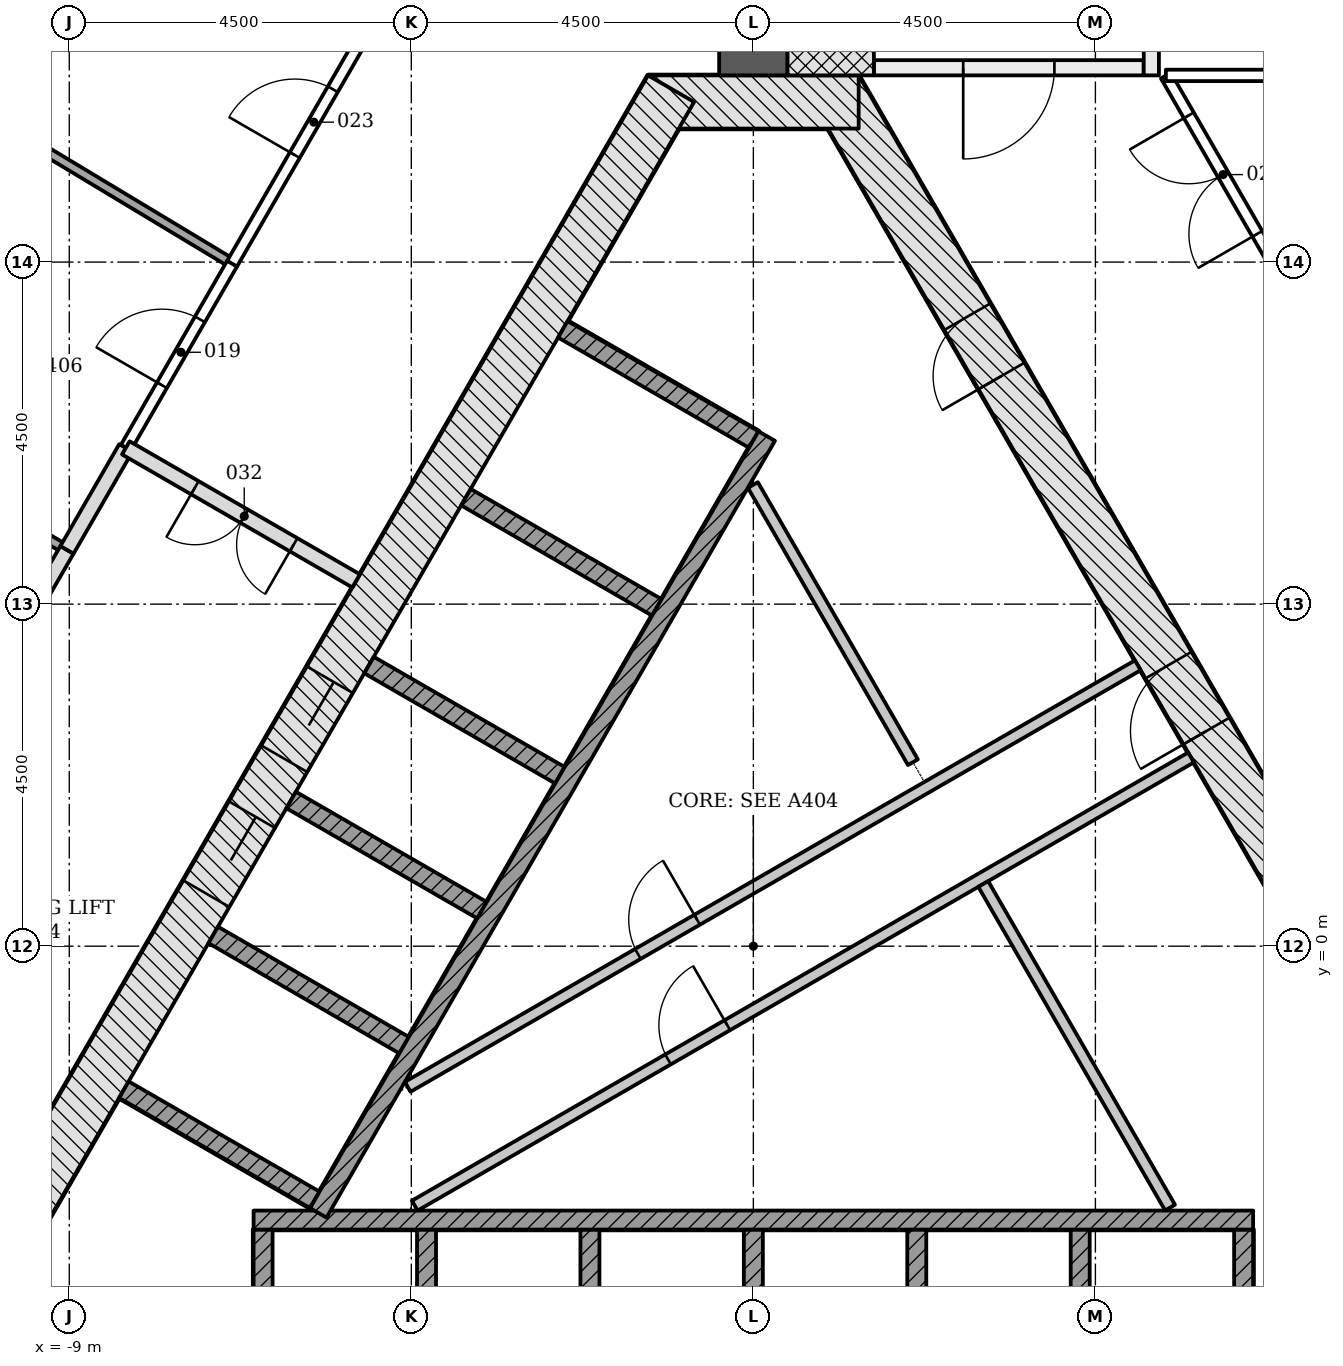
"""IFC4 building model, lengths in metres.
Left out: names, types, materials, properties, quantities, classifications, styles, units other than length and angle.
Written with IfcOpenShell. Run it as: python <this file> out.ifc"""

import sys

from ifc_helpers import new_model, si_unit, direction, frame, frame_2d, origin, place, context, subcontext, project, spatial, rectangle, extrude, element, fill, save


model = new_model("IFC4")
c1 = context("Model", 3, precision=1e-05, world=origin(), true_north=direction((0.0, 1.0)))
c2 = subcontext(c1, "Body", "Model", "MODEL_VIEW")
j1 = project(units=[si_unit("LENGTHUNIT", "METRE"), si_unit("PLANEANGLEUNIT", "RADIAN")], contexts=[c1])
p1 = place(None, origin())
s1 = spatial("IfcSite", under=j1, at=p1, CompositionType="ELEMENT")
p2 = place(p1, origin())
s2 = spatial("IfcBuilding", under=s1, at=p2, CompositionType="ELEMENT")
p3 = place(p2, frame((0.0, 0.0, 19.5)))
s3 = spatial("IfcBuildingStorey", under=s2, at=p3, CompositionType="ELEMENT", Elevation=19.5)
p4 = place(p3, frame((10.311, -4.703, -0.25), z_axis=(0.0, 0.0, 1.0), x_axis=(-0.500001446645, 0.866024568562, 0.0)))
e1 = element("IfcWall", 1, at=p4, inside=s3, PredefinedType="SHEAR", context=c2, shape_type="SweptSolid", body=[
    extrude(rectangle(XDim=18.458, YDim=0.7, at=frame_2d((9.229, 0.0))), origin(), (0.0, 0.0, 1.0), 4.55),
])
p5 = place(p4, frame((8.7, 0.0, 0.25)))
e2 = element("IfcOpeningElement", 2, at=p5, cuts=e1, PredefinedType="OPENING", context=c2, shape_type="SweptSolid", body=[
    extrude(rectangle(XDim=1.0, YDim=2.1, at=frame_2d((0.5, 1.05))), frame((0.0, 0.36, 0.0), z_axis=(0.0, -1.0, 0.0), x_axis=(1.0, 0.0, 0.0)), (0.0, 0.0, 1.0), 0.72),
])
p6 = place(p4, frame((4.002, 0.0, 0.25)))
e3 = element("IfcOpeningElement", 3, at=p6, cuts=e1, PredefinedType="OPENING", context=c2, shape_type="SweptSolid", body=[
    extrude(rectangle(XDim=0.9, YDim=2.1, at=frame_2d((0.45, 1.05))), frame((0.0, 0.36, 0.0), z_axis=(0.0, -1.0, 0.0), x_axis=(1.0, 0.0, 0.0)), (0.0, 0.0, 1.0), 0.72),
])
p7 = place(p4, frame((14.093, 0.0, 0.25)))
e4 = element("IfcOpeningElement", 4, at=p7, cuts=e1, PredefinedType="OPENING", context=c2, shape_type="SweptSolid", body=[
    extrude(rectangle(XDim=0.9, YDim=2.1, at=frame_2d((0.45, 1.05))), frame((0.0, 0.36, 0.0), z_axis=(0.0, -1.0, 0.0), x_axis=(1.0, 0.0, 0.0)), (0.0, 0.0, 1.0), 0.72),
])
p8 = place(p3, frame((1.386, 11.106, -0.25), z_axis=(0.0, 0.0, 1.0), x_axis=(-1.0, 0.0, 0.0)))
e5 = element("IfcWall", 5, at=p8, inside=s3, PredefinedType="SHEAR", context=c2, shape_type="SweptSolid", body=[
    extrude(rectangle(XDim=2.771, YDim=0.7, at=frame_2d((1.386, 0.0))), origin(), (0.0, 0.0, 1.0), 4.55),
])
p9 = place(p3, frame((-1.083, 11.281, -0.25), z_axis=(0.0, 0.0, 1.0), x_axis=(-0.500001446645, -0.866024568562, 0.0)))
e6 = element("IfcWall", 6, at=p9, inside=s3, PredefinedType="SHEAR", context=c2, shape_type="SweptSolid", body=[
    extrude(rectangle(XDim=18.458, YDim=0.7, at=frame_2d((9.229, 0.0))), origin(), (0.0, 0.0, 1.0), 4.55),
])
p10 = place(p9, frame((8.979, 0.0, 0.25)))
e7 = element("IfcOpeningElement", 7, at=p10, cuts=e6, PredefinedType="OPENING", context=c2, shape_type="SweptSolid", body=[
    extrude(rectangle(XDim=1.2, YDim=2.1, at=frame_2d((0.6, 1.05))), frame((0.0, 0.36, 0.0), z_axis=(0.0, -1.0, 0.0), x_axis=(1.0, 0.0, 0.0)), (0.0, 0.0, 1.0), 0.72),
])
p11 = place(p9, frame((11.029, 0.0, 0.25)))
e8 = element("IfcOpeningElement", 8, at=p11, cuts=e6, PredefinedType="OPENING", context=c2, shape_type="SweptSolid", body=[
    extrude(rectangle(XDim=1.2, YDim=2.1, at=frame_2d((0.6, 1.05))), frame((0.0, 0.36, 0.0), z_axis=(0.0, -1.0, 0.0), x_axis=(1.0, 0.0, 0.0)), (0.0, 0.0, 1.0), 0.72),
])
p12 = place(p3, frame((-10.311, -4.353, -0.25), z_axis=(0.0, 0.0, 1.0), x_axis=(0.500042739161, -0.866000726912, 0.0)))
e9 = element("IfcWall", 9, at=p12, inside=s3, PredefinedType="SHEAR", context=c2, shape_type="SweptSolid", body=[
    extrude(rectangle(XDim=2.771, YDim=0.7, at=frame_2d((1.386, 0.0))), origin(), (0.0, 0.0, 1.0), 4.55),
])
p13 = place(p3, frame((0.0, 11.456, -0.25), z_axis=(0.0, 0.0, 1.0), x_axis=(0.0, 1.0, 0.0)))
e10 = element("IfcWall", 10, at=p13, inside=s3, PredefinedType="SHEAR", context=c2, shape_type="SweptSolid", body=[
    extrude(rectangle(XDim=14.633, YDim=0.9, at=frame_2d((7.316, 0.0))), origin(), (0.0, 0.0, 1.0), 4.55),
])
p14 = place(p13, frame((7.35, 0.0, 0.25)))
e11 = element("IfcOpeningElement", 11, at=p14, cuts=e10, PredefinedType="OPENING", context=c2, shape_type="SweptSolid", body=[
    extrude(rectangle(XDim=1.5, YDim=2.1, at=frame_2d((0.75, 1.05))), frame((0.0, 0.46, 0.0), z_axis=(0.0, -1.0, 0.0), x_axis=(1.0, 0.0, 0.0)), (0.0, 0.0, 1.0), 0.92),
])
for number, where, z_axis, x_axis in (
    (12, (-6.45, -6.228, -0.25), (0.0, 0.0, 1.0), (0.0, 1.0, 0.0)),
    (13, (-4.3, -6.228, -0.25), (0.0, 0.0, 1.0), (0.0, 1.0, 0.0)),
    (14, (-2.15, -6.228, -0.25), (0.0, 0.0, 1.0), (0.0, 1.0, 0.0)),
    (15, (0.0, -6.228, -0.25), (0.0, 0.0, 1.0), (0.0, 1.0, 0.0)),
    (16, (2.15, -6.228, -0.25), (0.0, 0.0, 1.0), (0.0, 1.0, 0.0)),
    (17, (4.3, -6.228, -0.25), (0.0, 0.0, 1.0), (0.0, 1.0, 0.0)),
    (18, (6.45, -6.228, -0.25), (0.0, 0.0, 1.0), (0.0, 1.0, 0.0)),
):
    element("IfcWall", number, at=place(p3, frame(where, z_axis=z_axis, x_axis=x_axis)), inside=s3, PredefinedType="PARTITIONING", context=c2, shape_type="SweptSolid", body=[
        extrude(rectangle(XDim=2.5, YDim=0.25, at=frame_2d((1.25, 0.0))), origin(), (0.0, 0.0, 1.0), 4.55),
    ])
p15 = place(p3, frame((-6.575, -3.603, 0.0), z_axis=(0.0, 0.0, 1.0), x_axis=(1.0, 0.0, 0.0)))
e19 = element("IfcWall", 19, at=p15, inside=s3, PredefinedType="PARTITIONING", context=c2, shape_type="SweptSolid", body=[
    extrude(rectangle(XDim=13.15, YDim=0.25, at=frame_2d((6.575, 0.0))), origin(), (0.0, 0.0, 1.0), 4.3),
])
p16 = place(p3, frame((-2.506, 8.115, -0.25), z_axis=(0.0, 0.0, 1.0), x_axis=(0.865996321171, -0.50005036918, 0.0)))
e20 = element("IfcWall", 20, at=p16, inside=s3, PredefinedType="PARTITIONING", context=c2, shape_type="SweptSolid", body=[
    extrude(rectangle(XDim=2.9, YDim=0.25, at=frame_2d((1.45, 0.0))), origin(), (0.0, 0.0, 1.0), 4.55),
])
for number, where, z_axis, x_axis in (
    (21, (-3.781, 5.907, -0.25), (0.0, 0.0, 1.0), (0.866, -0.5, 0.0)),
    (22, (-5.056, 3.699, -0.25), (0.0, 0.0, 1.0), (0.866, -0.5, 0.0)),
    (23, (-6.081, 1.923, -0.25), (0.0, 0.0, 1.0), (0.866, -0.5, 0.0)),
    (24, (-7.106, 0.148, -0.25), (0.0, 0.0, 1.0), (0.866, -0.5, 0.0)),
    (25, (-8.281, -1.887, -0.25), (0.0, 0.0, 1.0), (0.866, -0.5, 0.0)),
):
    element("IfcWall", number, at=place(p3, frame(where, z_axis=z_axis, x_axis=x_axis)), inside=s3, PredefinedType="PARTITIONING", context=c2, shape_type="SweptSolid", body=[
        extrude(rectangle(XDim=2.9, YDim=0.25, at=frame_2d((1.45, 0.0))), origin(), (0.0, 0.0, 1.0), 4.55),
    ])
p17 = place(p3, frame((0.176, 6.711, 0.0), z_axis=(0.0, 0.0, 1.0), x_axis=(-0.500004227369, -0.866022963098, 0.0)))
e26 = element("IfcWall", 26, at=p17, inside=s3, PredefinedType="PARTITIONING", context=c2, shape_type="SweptSolid", body=[
    extrude(rectangle(XDim=11.8, YDim=0.25, at=frame_2d((5.9, 0.0))), origin(), (0.0, 0.0, 1.0), 4.3),
])
p18 = place(p3, frame((-4.548, -1.851, 0.0), z_axis=(0.0, 0.0, 1.0), x_axis=(0.866023939251, 0.500002536638, 0.0)))
e27 = element("IfcWall", 27, at=p18, inside=s3, PredefinedType="PARTITIONING", context=c2, shape_type="SweptSolid", body=[
    extrude(rectangle(XDim=11.092, YDim=0.15, at=frame_2d((5.546, 0.0))), origin(), (0.0, 0.0, 1.0), 4.3),
])
p19 = place(p18, frame((3.497, 0.0, 0.0)))
e28 = element("IfcOpeningElement", 28, at=p19, cuts=e27, PredefinedType="OPENING", context=c2, shape_type="SweptSolid", body=[
    extrude(rectangle(XDim=0.9, YDim=2.1, at=frame_2d((0.45, 1.05))), frame((0.0, 0.085, 0.0), z_axis=(0.0, -1.0, 0.0), x_axis=(1.0, 0.0, 0.0)), (0.0, 0.0, 1.0), 0.17),
])
p20 = place(p3, frame((2.099, 2.42, 0.0), z_axis=(0.0, 0.0, 1.0), x_axis=(-0.499998449073, 0.866026299211, 0.0)))
e29 = element("IfcWall", 29, at=p20, inside=s3, PredefinedType="PARTITIONING", context=c2, shape_type="SweptSolid", body=[
    extrude(rectangle(XDim=4.211, YDim=0.15, at=frame_2d((2.106, 0.0))), origin(), (0.0, 0.0, 1.0), 4.3),
])
p21 = place(p3, frame((-4.454, -3.413, 0.0), z_axis=(0.0, 0.0, 1.0), x_axis=(0.86603043987, 0.499991277142, 0.0)))
e30 = element("IfcWall", 30, at=p21, inside=s3, PredefinedType="PARTITIONING", context=c2, shape_type="SweptSolid", body=[
    extrude(rectangle(XDim=11.792, YDim=0.15, at=frame_2d((5.896, 0.0))), origin(), (0.0, 0.0, 1.0), 4.3),
])
p22 = place(p21, frame((3.847, 0.0, 0.0)))
e31 = element("IfcOpeningElement", 31, at=p22, cuts=e30, PredefinedType="OPENING", context=c2, shape_type="SweptSolid", body=[
    extrude(rectangle(XDim=0.9, YDim=2.1, at=frame_2d((0.45, 1.05))), frame((0.0, 0.085, 0.0), z_axis=(0.0, -1.0, 0.0), x_axis=(1.0, 0.0, 0.0)), (0.0, 0.0, 1.0), 0.17),
])
p23 = place(p3, frame((5.482, -3.439, 0.0), z_axis=(0.0, 0.0, 1.0), x_axis=(-0.500006183238, 0.866021833861, 0.0)))
e32 = element("IfcWall", 32, at=p23, inside=s3, PredefinedType="PARTITIONING", context=c2, shape_type="SweptSolid", body=[
    extrude(rectangle(XDim=4.916, YDim=0.15, at=frame_2d((2.458, 0.0))), origin(), (0.0, 0.0, 1.0), 4.3),
])
p24 = place(p3, frame((5.135, 11.556, -0.25), z_axis=(0.0, 0.0, 1.0), x_axis=(-1.0, 0.0, 0.0)))
e33 = element("IfcWall", 33, at=p24, inside=s3, PredefinedType="SHEAR", context=c2, shape_type="SweptSolid", body=[
    extrude(rectangle(XDim=3.55, YDim=0.2, at=frame_2d((1.775, 0.0))), origin(), (0.0, 0.0, 1.0), 4.55),
])
p25 = place(p24, frame((1.175, 0.0, 0.25)))
e34 = element("IfcOpeningElement", 34, at=p25, cuts=e33, PredefinedType="OPENING", context=c2, shape_type="SweptSolid", body=[
    extrude(rectangle(XDim=1.2, YDim=2.1, at=frame_2d((0.6, 1.05))), frame((0.0, 0.11, 0.0), z_axis=(0.0, -1.0, 0.0), x_axis=(1.0, 0.0, 0.0)), (0.0, 0.0, 1.0), 0.22),
])
p26 = place(p3, frame((5.236, 11.456, -0.25), z_axis=(0.0, 0.0, 1.0), x_axis=(0.0, 1.0, 0.0)))
e35 = element("IfcWall", 35, at=p26, inside=s3, PredefinedType="SHEAR", context=c2, shape_type="SweptSolid", body=[
    extrude(rectangle(XDim=5.6, YDim=0.2, at=frame_2d((2.8, 0.0))), origin(), (0.0, 0.0, 1.0), 4.55),
])
p27 = place(p26, frame((0.45, 0.0, 0.25)))
e36 = element("IfcOpeningElement", 36, at=p27, cuts=e35, PredefinedType="OPENING", context=c2, shape_type="SweptSolid", body=[
    extrude(rectangle(XDim=1.2, YDim=2.1, at=frame_2d((0.6, 1.05))), frame((0.0, 0.11, 0.0), z_axis=(0.0, -1.0, 0.0), x_axis=(1.0, 0.0, 0.0)), (0.0, 0.0, 1.0), 0.22),
])
p28 = place(p3, frame((1.018, 11.456, -0.25), z_axis=(0.0, 0.0, 1.0), x_axis=(0.0, 1.0, 0.0)))
e37 = element("IfcWall", 37, at=p28, inside=s3, PredefinedType="SHEAR", context=c2, shape_type="SweptSolid", body=[
    extrude(rectangle(XDim=7.2, YDim=1.136, at=frame_2d((3.6, 0.0))), origin(), (0.0, 0.0, 1.0), 4.55),
])
p29 = place(p3, frame((-9.031, 5.213, 0.0), z_axis=(0.0, 0.0, 1.0), x_axis=(-0.500044734646, -0.865999574684, 0.0)))
e38 = element("IfcWall", 38, at=p29, inside=s3, PredefinedType="PARTITIONING", context=c2, shape_type="SweptSolid", body=[
    extrude(rectangle(XDim=4.35, YDim=0.2, at=frame_2d((2.175, 0.0))), origin(), (0.0, 0.0, 1.0), 3.688),
])
p30 = place(p3, frame((-8.256, 6.555, 0.0), z_axis=(0.0, 0.0, 1.0), x_axis=(-0.499904469662, -0.866080551226, 0.0)))
e39 = element("IfcWall", 39, at=p30, inside=s3, PredefinedType="PARTITIONING", context=c2, shape_type="SweptSolid", body=[
    extrude(rectangle(XDim=1.548, YDim=0.2, at=frame_2d((0.774, 0.0))), origin(), (0.0, 0.0, 1.0), 3.688),
])
p31 = place(p3, frame((-5.226, 4.806, 0.0), z_axis=(0.0, 0.0, 1.0), x_axis=(-0.865949687125, 0.500131122175, 0.0)))
e40 = element("IfcWall", 40, at=p31, inside=s3, PredefinedType="PARTITIONING", context=c2, shape_type="SweptSolid", body=[
    extrude(rectangle(XDim=3.499, YDim=0.2, at=frame_2d((1.75, 0.0))), origin(), (0.0, 0.0, 1.0), 4.3),
])
p32 = place(p31, frame((0.95, 0.0, 0.0)))
e41 = element("IfcOpeningElement", 41, at=p32, cuts=e40, PredefinedType="OPENING", context=c2, shape_type="SweptSolid", body=[
    extrude(rectangle(XDim=1.5, YDim=2.1, at=frame_2d((0.75, 1.05))), frame((0.0, 0.11, 0.0), z_axis=(0.0, -1.0, 0.0), x_axis=(1.0, 0.0, 0.0)), (0.0, 0.0, 1.0), 0.22),
])
p33 = place(p3, frame((6.855, 8.982, 0.0), z_axis=(0.0, 0.0, 1.0), x_axis=(-0.500176439337, 0.865923512519, 0.0)))
e42 = element("IfcWall", 42, at=p33, inside=s3, PredefinedType="PARTITIONING", context=c2, shape_type="SweptSolid", body=[
    extrude(rectangle(XDim=2.855, YDim=0.15, at=frame_2d((1.427, 0.0))), origin(), (0.0, 0.0, 1.0), 3.698),
])
p34 = place(p33, frame((0.45, 0.0, 0.0)))
e43 = element("IfcOpeningElement", 43, at=p34, cuts=e42, PredefinedType="OPENING", context=c2, shape_type="SweptSolid", body=[
    extrude(rectangle(XDim=1.8, YDim=2.1, at=frame_2d((0.9, 1.05))), frame((0.0, 0.085, 0.0), z_axis=(0.0, -1.0, 0.0), x_axis=(1.0, 0.0, 0.0)), (0.0, 0.0, 1.0), 0.17),
])
p35 = place(p3, frame((5.427, 11.456, 0.0), z_axis=(0.0, 0.0, 1.0), x_axis=(1.0, 0.0, 0.0)))
e44 = element("IfcWall", 44, at=p35, inside=s3, PredefinedType="PARTITIONING", context=c2, shape_type="SweptSolid", body=[
    extrude(rectangle(XDim=1.708, YDim=0.15, at=frame_2d((0.854, 0.0))), origin(), (0.0, 0.0, 1.0), 4.3),
])
p36 = place(p3, frame((-9.032, 5.214, 0.0), z_axis=(0.0, 0.0, 1.0), x_axis=(-0.866038805516, 0.499976786802, 0.0)))
e45 = element("IfcWall", 45, at=p36, inside=s3, PredefinedType="PARTITIONING", context=c2, shape_type="SweptSolid", body=[
    extrude(rectangle(XDim=4.598, YDim=0.12, at=frame_2d((2.299, 0.0))), origin(), (0.0, 0.0, 1.0), 3.688),
])
p37 = place(p3, frame((-6.857, 8.983, 0.0), z_axis=(0.0, 0.0, 1.0), x_axis=(-0.856691171268, 0.515829658968, 0.0)))
e46 = element("IfcWall", 46, at=p37, inside=s3, PredefinedType="PARTITIONING", context=c2, shape_type="SweptSolid", body=[
    extrude(rectangle(XDim=4.6, YDim=0.12, at=frame_2d((2.3, 0.0))), origin(), (0.0, 0.0, 1.0), 3.698),
])
p38 = place(p3, frame((-8.256, 6.558, 0.0), z_axis=(0.0, 0.0, 1.0), x_axis=(0.500081734942, 0.86597820895, 0.0)))
e47 = element("IfcWall", 47, at=p38, inside=s3, PredefinedType="PARTITIONING", context=c2, shape_type="SweptSolid", body=[
    extrude(rectangle(XDim=2.804, YDim=0.15, at=frame_2d((1.402, 0.0))), origin(), (0.0, 0.0, 1.0), 3.698),
])
p39 = place(p38, frame((0.95, 0.0, 0.0)))
e48 = element("IfcOpeningElement", 48, at=p39, cuts=e47, PredefinedType="OPENING", context=c2, shape_type="SweptSolid", body=[
    extrude(rectangle(XDim=1.0, YDim=2.1, at=frame_2d((0.5, 1.05))), frame((0.0, 0.085, 0.0), z_axis=(0.0, -1.0, 0.0), x_axis=(1.0, 0.0, 0.0)), (0.0, 0.0, 1.0), 0.17),
])
p40 = place(p3, frame((-6.858, 8.979, 0.0), z_axis=(0.0, 0.0, 1.0), x_axis=(0.500105111742, 0.865964708986, 0.0)))
e49 = element("IfcWall", 49, at=p40, inside=s3, PredefinedType="PARTITIONING", context=c2, shape_type="SweptSolid", body=[
    extrude(rectangle(XDim=4.363, YDim=0.15, at=frame_2d((2.181, 0.0))), origin(), (0.0, 0.0, 1.0), 3.698),
])
p41 = place(p40, frame((1.65, 0.0, 0.0)))
e50 = element("IfcOpeningElement", 50, at=p41, cuts=e49, PredefinedType="OPENING", context=c2, shape_type="SweptSolid", body=[
    extrude(rectangle(XDim=1.0, YDim=2.1, at=frame_2d((0.5, 1.05))), frame((0.0, 0.085, 0.0), z_axis=(0.0, -1.0, 0.0), x_axis=(1.0, 0.0, 0.0)), (0.0, 0.0, 1.0), 0.17),
])
p42 = place(p3, frame((-9.17, 15.572, 0.0), z_axis=(0.0, 0.0, 1.0), x_axis=(-0.499902881486, -0.866081467924, 0.0)))
e51 = element("IfcWall", 51, at=p42, inside=s3, PredefinedType="PARTITIONING", context=c2, shape_type="SweptSolid", body=[
    extrude(rectangle(XDim=4.451, YDim=0.12, at=frame_2d((2.226, 0.0))), origin(), (0.0, 0.0, 1.0), 3.698),
])
p43 = place(p42, frame((1.75, 0.0, 0.0)))
e52 = element("IfcOpeningElement", 52, at=p43, cuts=e51, PredefinedType="OPENING", context=c2, shape_type="SweptSolid", body=[
    extrude(rectangle(XDim=1.0, YDim=2.1, at=frame_2d((0.5, 1.05))), frame((0.0, 0.07, 0.0), z_axis=(0.0, -1.0, 0.0), x_axis=(1.0, 0.0, 0.0)), (0.0, 0.0, 1.0), 0.14),
])
p44 = place(p10, origin())
e53 = element("IfcDoor", 53, at=p44, inside=s3, OperationType="DOUBLE_DOOR_SLIDING", PredefinedType="DOOR", context=c2, shape_type="SweptSolid", body=[
    extrude(rectangle(XDim=1.2, YDim=2.1, at=frame_2d((0.6, 1.05))), frame((0.0, 0.025, 0.0), z_axis=(0.0, -1.0, 0.0), x_axis=(1.0, 0.0, 0.0)), (0.0, 0.0, 1.0), 0.05),
])
fill(e7, e53)
p45 = place(p11, origin())
e54 = element("IfcDoor", 54, at=p45, inside=s3, OperationType="DOUBLE_DOOR_SLIDING", PredefinedType="DOOR", context=c2, shape_type="SweptSolid", body=[
    extrude(rectangle(XDim=1.2, YDim=2.1, at=frame_2d((0.6, 1.05))), frame((0.0, 0.025, 0.0), z_axis=(0.0, -1.0, 0.0), x_axis=(1.0, 0.0, 0.0)), (0.0, 0.0, 1.0), 0.05),
])
fill(e8, e54)
p46 = place(p5, origin())
e55 = element("IfcDoor", 55, at=p46, inside=s3, OperationType="SINGLE_SWING_LEFT", PredefinedType="DOOR", context=c2, shape_type="SweptSolid", body=[
    extrude(rectangle(XDim=1.0, YDim=2.1, at=frame_2d((0.5, 1.05))), frame((0.0, 0.075, 0.0), z_axis=(0.0, -1.0, 0.0), x_axis=(1.0, 0.0, 0.0)), (0.0, 0.0, 1.0), 0.15),
])
fill(e2, e55)
p47 = place(p7, origin())
e56 = element("IfcDoor", 56, at=p47, inside=s3, OperationType="SINGLE_SWING_LEFT", PredefinedType="DOOR", context=c2, shape_type="SweptSolid", body=[
    extrude(rectangle(XDim=0.9, YDim=2.1, at=frame_2d((0.45, 1.05))), frame((0.0, 0.075, 0.0), z_axis=(0.0, -1.0, 0.0), x_axis=(1.0, 0.0, 0.0)), (0.0, 0.0, 1.0), 0.15),
])
fill(e4, e56)
p48 = place(p22, origin())
e57 = element("IfcDoor", 57, at=p48, inside=s3, OperationType="SINGLE_SWING_RIGHT", PredefinedType="DOOR", context=c2, shape_type="SweptSolid", body=[
    extrude(rectangle(XDim=0.9, YDim=2.1, at=frame_2d((0.45, 1.05))), frame((0.0, 0.025, 0.0), z_axis=(0.0, -1.0, 0.0), x_axis=(1.0, 0.0, 0.0)), (0.0, 0.0, 1.0), 0.05),
])
fill(e31, e57)
p49 = place(p19, origin())
e58 = element("IfcDoor", 58, at=p49, inside=s3, OperationType="SINGLE_SWING_RIGHT", PredefinedType="DOOR", context=c2, shape_type="SweptSolid", body=[
    extrude(rectangle(XDim=0.9, YDim=2.1, at=frame_2d((0.45, 1.05))), frame((0.0, 0.025, 0.0), z_axis=(0.0, -1.0, 0.0), x_axis=(1.0, 0.0, 0.0)), (0.0, 0.0, 1.0), 0.05),
])
fill(e28, e58)
p50 = place(p25, origin())
e59 = element("IfcDoor", 59, at=p50, inside=s3, OperationType="SINGLE_SWING_RIGHT", PredefinedType="DOOR", context=c2, shape_type="SweptSolid", body=[
    extrude(rectangle(XDim=1.2, YDim=2.1, at=frame_2d((0.6, 1.05))), frame((0.0, 0.025, 0.0), z_axis=(0.0, -1.0, 0.0), x_axis=(1.0, 0.0, 0.0)), (0.0, 0.0, 1.0), 0.05),
])
fill(e34, e59)
p51 = place(p39, origin())
e60 = element("IfcDoor", 60, at=p51, inside=s3, OperationType="SINGLE_SWING_RIGHT", PredefinedType="DOOR", context=c2, shape_type="SweptSolid", body=[
    extrude(rectangle(XDim=1.0, YDim=2.1, at=frame_2d((0.5, 1.05))), frame((0.0, 0.025, 0.0), z_axis=(0.0, -1.0, 0.0), x_axis=(1.0, 0.0, 0.0)), (0.0, 0.0, 1.0), 0.05),
])
fill(e48, e60)
p52 = place(p41, origin())
e61 = element("IfcDoor", 61, at=p52, inside=s3, OperationType="SINGLE_SWING_LEFT", PredefinedType="DOOR", context=c2, shape_type="SweptSolid", body=[
    extrude(rectangle(XDim=1.0, YDim=2.1, at=frame_2d((0.5, 1.05))), frame((0.0, 0.025, 0.0), z_axis=(0.0, -1.0, 0.0), x_axis=(1.0, 0.0, 0.0)), (0.0, 0.0, 1.0), 0.05),
])
fill(e50, e61)
p53 = place(p34, origin())
e62 = element("IfcDoor", 62, at=p53, inside=s3, OperationType="DOUBLE_DOOR_SINGLE_SWING", PredefinedType="DOOR", context=c2, shape_type="SweptSolid", body=[
    extrude(rectangle(XDim=1.8, YDim=2.1, at=frame_2d((0.9, 1.05))), frame((0.0, 0.025, 0.0), z_axis=(0.0, -1.0, 0.0), x_axis=(1.0, 0.0, 0.0)), (0.0, 0.0, 1.0), 0.05),
])
fill(e43, e62)
p54 = place(p32, origin())
e63 = element("IfcDoor", 63, at=p54, inside=s3, OperationType="DOUBLE_DOOR_SINGLE_SWING", PredefinedType="DOOR", context=c2, shape_type="SweptSolid", body=[
    extrude(rectangle(XDim=1.5, YDim=2.1, at=frame_2d((0.75, 1.05))), frame((0.0, 0.025, 0.0), z_axis=(0.0, -1.0, 0.0), x_axis=(1.0, 0.0, 0.0)), (0.0, 0.0, 1.0), 0.05),
])
fill(e41, e63)
save(model, sys.argv[1])
